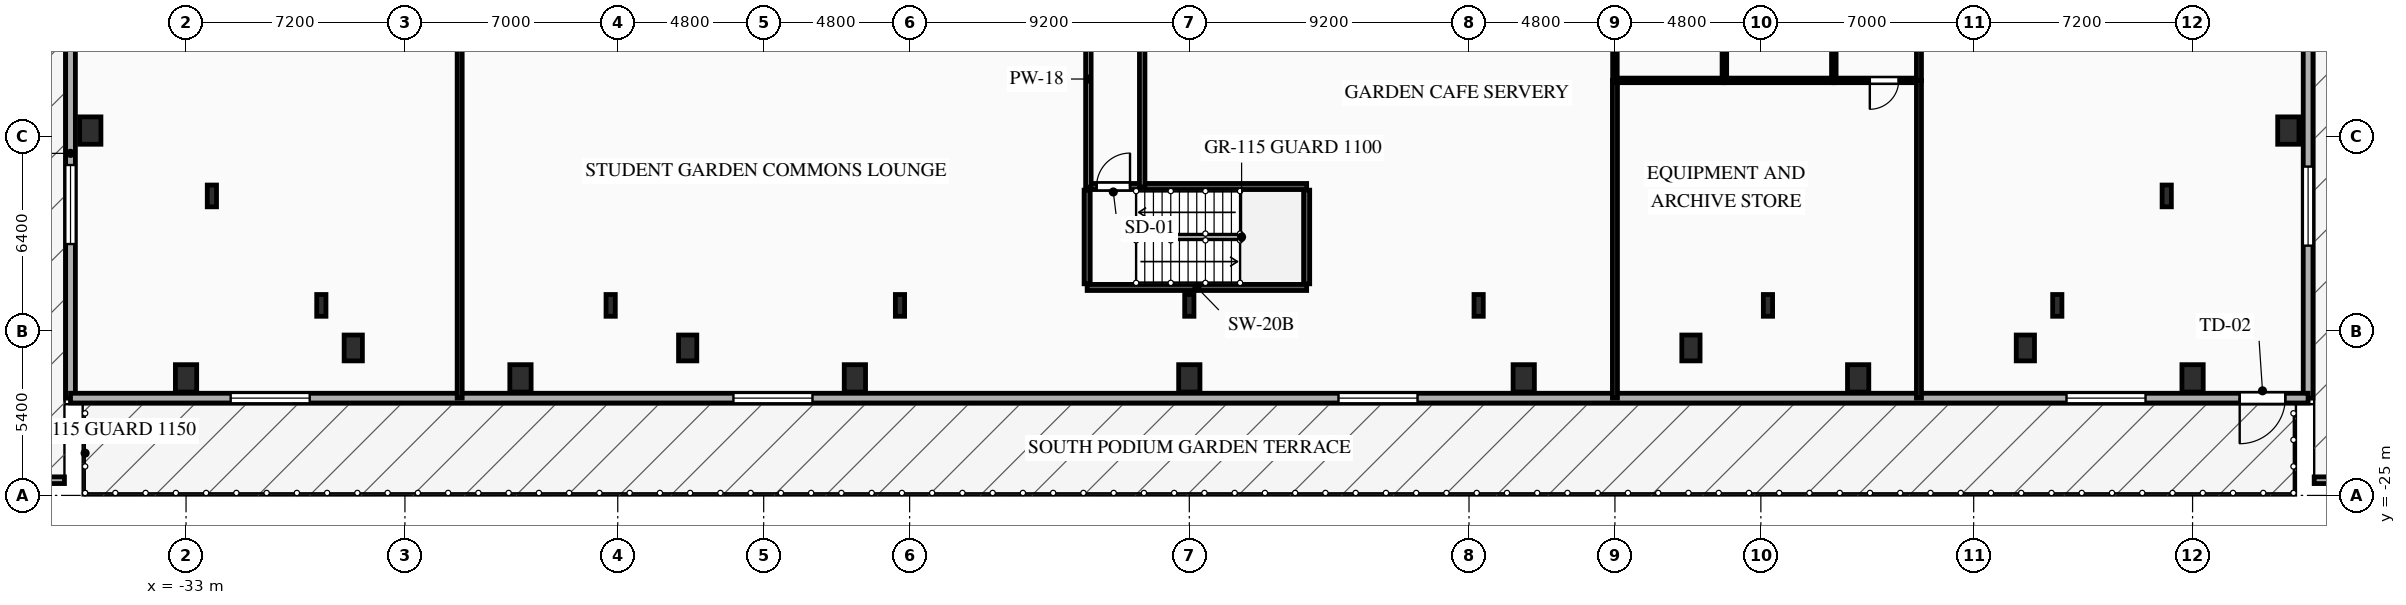
"""IFC4 building model, lengths in metres.
Left out: names, types, materials, properties, quantities, classifications, styles, units other than length and angle.
Written with IfcOpenShell. Run it as: python <this file> out.ifc"""

import sys

from ifc_helpers import new_model, si_unit, direction, frame, frame_2d, origin, origin_2d, place, context, subcontext, project, spatial, rectangle, i_section, extrude, element, fill, save


model = new_model("IFC4")
c1 = context("Model", 3, precision=1e-05, world=origin(), true_north=direction((0.0, 1.0)))
c2 = subcontext(c1, "Body", "Model", "MODEL_VIEW")
j1 = project(units=[si_unit("LENGTHUNIT", "METRE"), si_unit("PLANEANGLEUNIT", "RADIAN")], contexts=[c1])
p1 = place(None, origin())
s1 = spatial("IfcSite", under=j1, at=p1, CompositionType="ELEMENT")
p2 = place(p1, origin())
s2 = spatial("IfcBuilding", under=s1, at=p2, CompositionType="ELEMENT")
p3 = place(p2, frame((0.0, 0.0, 13.5)))
s3 = spatial("IfcBuildingStorey", under=s2, at=p3, CompositionType="ELEMENT", Elevation=13.5)
for number, where, z_axis, x_axis in (
    (1, (-33.0, -21.15, 0.0), (0.0, 0.0, 1.0), (1.0, 0.0, 0.0)),
    (2, (-22.0, -21.15, 0.0), (0.0, 0.0, 1.0), (1.0, 0.0, 0.0)),
    (3, (-11.0, -21.15, 0.0), (0.0, 0.0, 1.0), (1.0, 0.0, 0.0)),
    (4, (0.0, -21.15, 0.0), (0.0, 0.0, 1.0), (1.0, 0.0, 0.0)),
    (5, (11.0, -21.15, 0.0), (0.0, 0.0, 1.0), (1.0, 0.0, 0.0)),
    (6, (22.0, -21.15, 0.0), (0.0, 0.0, 1.0), (1.0, 0.0, 0.0)),
    (7, (33.0, -21.15, 0.0), (0.0, 0.0, 1.0), (1.0, 0.0, 0.0)),
    (8, (-36.15, -13.0, 0.0), (0.0, 0.0, 1.0), (1.0, 0.0, 0.0)),
    (9, (36.15, -13.0, 0.0), (0.0, 0.0, 1.0), (1.0, 0.0, 0.0)),
):
    element("IfcColumn", number, at=place(p3, frame(where, z_axis=z_axis, x_axis=x_axis)), inside=s3, PredefinedType="COLUMN", context=c2, shape_type="SweptSolid", body=[
        extrude(rectangle(XDim=0.7, YDim=0.9, at=origin_2d()), origin(), (0.0, 0.0, 1.0), 4.5),
    ])
for number, where, z_axis, x_axis in (
    (10, (-27.5, -20.15, 0.0), (0.0, 0.0, 1.0), (1.0, 0.0, 0.0)),
    (11, (-16.5, -20.15, 0.0), (0.0, 0.0, 1.0), (1.0, 0.0, 0.0)),
    (12, (16.5, -20.15, 0.0), (0.0, 0.0, 1.0), (1.0, 0.0, 0.0)),
    (13, (27.5, -20.15, 0.0), (0.0, 0.0, 1.0), (1.0, 0.0, 0.0)),
):
    element("IfcColumn", number, at=place(p3, frame(where, z_axis=z_axis, x_axis=x_axis)), inside=s3, PredefinedType="PILASTER", context=c2, shape_type="SweptSolid", body=[
        extrude(rectangle(XDim=0.6, YDim=0.85, at=origin_2d()), origin(), (0.0, 0.0, 1.0), 4.5),
    ])
for number, where, z_axis, x_axis in (
    (14, (-28.55, -18.75, 0.0), (0.0, 0.0, 1.0), (1.0, 0.0, 0.0)),
    (15, (-19.033, -18.75, 0.0), (0.0, 0.0, 1.0), (1.0, 0.0, 0.0)),
    (16, (-9.517, -18.75, 0.0), (0.0, 0.0, 1.0), (1.0, 0.0, 0.0)),
    (17, (0.0, -18.75, 0.0), (0.0, 0.0, 1.0), (1.0, 0.0, 0.0)),
    (18, (9.517, -18.75, 0.0), (0.0, 0.0, 1.0), (1.0, 0.0, 0.0)),
    (19, (19.033, -18.75, 0.0), (0.0, 0.0, 1.0), (1.0, 0.0, 0.0)),
    (20, (28.55, -18.75, 0.0), (0.0, 0.0, 1.0), (1.0, 0.0, 0.0)),
    (21, (32.15, -15.15, 0.0), (0.0, 0.0, 1.0), (1.0, 0.0, 0.0)),
    (22, (-32.15, -15.15, 0.0), (0.0, 0.0, 1.0), (1.0, 0.0, 0.0)),
):
    element("IfcColumn", number, at=place(p3, frame(where, z_axis=z_axis, x_axis=x_axis)), inside=s3, PredefinedType="COLUMN", context=c2, shape_type="SweptSolid", body=[
        extrude(i_section(OverallWidth=0.304, OverallDepth=0.716, WebThickness=0.021, FlangeThickness=0.04, FilletRadius=0.027, at=origin_2d()), origin(), (0.0, 0.0, 1.0), 4.5),
    ])
p4 = place(p3, frame((-36.8, -21.8, 0.0), z_axis=(0.0, 0.0, 1.0), x_axis=(0.0, 1.0, 0.0)))
e23 = element("IfcWall", 23, at=p4, inside=s3, PredefinedType="SOLIDWALL", context=c2, shape_type="SweptSolid", body=[
    extrude(rectangle(XDim=16.1, YDim=0.32, at=frame_2d((8.05, 0.0))), origin(), (0.0, 0.0, 1.0), 4.17),
])
p5 = place(p4, frame((5.067, 0.0, 0.85)))
e24 = element("IfcOpeningElement", 24, at=p5, cuts=e23, PredefinedType="OPENING", context=c2, shape_type="SweptSolid", body=[
    extrude(rectangle(XDim=2.6, YDim=2.4, at=frame_2d((1.3, 1.2))), frame((0.0, 0.17, 0.0), z_axis=(0.0, -1.0, 0.0), x_axis=(1.0, 0.0, 0.0)), (0.0, 0.0, 1.0), 0.34),
])
p6 = place(p3, frame((36.8, -5.7, 0.0), z_axis=(0.0, 0.0, 1.0), x_axis=(0.0, -1.0, 0.0)))
e25 = element("IfcWall", 25, at=p6, inside=s3, PredefinedType="SOLIDWALL", context=c2, shape_type="SweptSolid", body=[
    extrude(rectangle(XDim=16.1, YDim=0.32, at=frame_2d((8.05, 0.0))), origin(), (0.0, 0.0, 1.0), 4.17),
])
p7 = place(p6, frame((8.485, 0.0, 0.85)))
e26 = element("IfcOpeningElement", 26, at=p7, cuts=e25, PredefinedType="OPENING", context=c2, shape_type="SweptSolid", body=[
    extrude(rectangle(XDim=2.6, YDim=2.4, at=frame_2d((1.3, 1.2))), frame((0.0, 0.17, 0.0), z_axis=(0.0, -1.0, 0.0), x_axis=(1.0, 0.0, 0.0)), (0.0, 0.0, 1.0), 0.34),
])
p8 = place(p3, frame((36.8, -21.8, 0.0), z_axis=(0.0, 0.0, 1.0), x_axis=(-1.0, 0.0, 0.0)))
e27 = element("IfcWall", 27, at=p8, inside=s3, PredefinedType="SOLIDWALL", context=c2, shape_type="SweptSolid", body=[
    extrude(rectangle(XDim=73.6, YDim=0.32, at=frame_2d((36.8, 0.0))), origin(), (0.0, 0.0, 1.0), 4.17),
])
p9 = place(p8, frame((0.75, 0.0, 0.0)))
e28 = element("IfcOpeningElement", 28, at=p9, cuts=e27, PredefinedType="OPENING", context=c2, shape_type="SweptSolid", body=[
    extrude(rectangle(XDim=1.5, YDim=2.2, at=frame_2d((0.75, 1.1))), frame((0.0, 0.17, 0.0), z_axis=(0.0, -1.0, 0.0), x_axis=(1.0, 0.0, 0.0)), (0.0, 0.0, 1.0), 0.34),
])
p10 = place(p8, frame((5.347, 0.0, 0.85)))
e29 = element("IfcOpeningElement", 29, at=p10, cuts=e27, PredefinedType="OPENING", context=c2, shape_type="SweptSolid", body=[
    extrude(rectangle(XDim=2.6, YDim=2.4, at=frame_2d((1.3, 1.2))), frame((0.0, 0.17, 0.0), z_axis=(0.0, -1.0, 0.0), x_axis=(1.0, 0.0, 0.0)), (0.0, 0.0, 1.0), 0.34),
])
p11 = place(p8, frame((29.293, 0.0, 0.85)))
e30 = element("IfcOpeningElement", 30, at=p11, cuts=e27, PredefinedType="OPENING", context=c2, shape_type="SweptSolid", body=[
    extrude(rectangle(XDim=2.6, YDim=2.4, at=frame_2d((1.3, 1.2))), frame((0.0, 0.17, 0.0), z_axis=(0.0, -1.0, 0.0), x_axis=(1.0, 0.0, 0.0)), (0.0, 0.0, 1.0), 0.34),
])
p12 = place(p8, frame((49.195, 0.0, 0.85)))
e31 = element("IfcOpeningElement", 31, at=p12, cuts=e27, PredefinedType="OPENING", context=c2, shape_type="SweptSolid", body=[
    extrude(rectangle(XDim=2.6, YDim=2.4, at=frame_2d((1.3, 1.2))), frame((0.0, 0.17, 0.0), z_axis=(0.0, -1.0, 0.0), x_axis=(1.0, 0.0, 0.0)), (0.0, 0.0, 1.0), 0.34),
])
p13 = place(p8, frame((65.733, 0.0, 0.85)))
e32 = element("IfcOpeningElement", 32, at=p13, cuts=e27, PredefinedType="OPENING", context=c2, shape_type="SweptSolid", body=[
    extrude(rectangle(XDim=2.6, YDim=2.4, at=frame_2d((1.3, 1.2))), frame((0.0, 0.17, 0.0), z_axis=(0.0, -1.0, 0.0), x_axis=(1.0, 0.0, 0.0)), (0.0, 0.0, 1.0), 0.34),
])
for number, where, z_axis, x_axis in (
    (33, (-38.5, -24.5, 0.0), (0.0, 0.0, 1.0), (1.0, 0.0, 0.0)),
    (34, (37.0, -24.5, 0.0), (0.0, 0.0, 1.0), (1.0, 0.0, 0.0)),
):
    element("IfcWall", number, at=place(p3, frame(where, z_axis=z_axis, x_axis=x_axis)), inside=s3, PredefinedType="PARAPET", context=c2, shape_type="SweptSolid", body=[
        extrude(rectangle(XDim=1.5, YDim=0.22, at=frame_2d((0.75, 0.0))), origin(), (0.0, 0.0, 1.0), 0.65),
    ])
p14 = place(p3, frame((-3.36, -14.84, 0.0), z_axis=(0.0, 0.0, 1.0), x_axis=(1.0, 0.0, 0.0)))
e35 = element("IfcWall", 35, at=p14, inside=s3, PredefinedType="SHEAR", context=c2, shape_type="SweptSolid", body=[
    extrude(rectangle(XDim=7.22, YDim=0.2, at=frame_2d((3.61, 0.0))), origin(), (0.0, 0.0, 1.0), 4.17),
])
p15 = place(p14, frame((0.31, 0.0, 0.0)))
e36 = element("IfcOpeningElement", 36, at=p15, cuts=e35, PredefinedType="OPENING", context=c2, shape_type="SweptSolid", body=[
    extrude(rectangle(XDim=1.1, YDim=2.15, at=frame_2d((0.55, 1.075))), frame((0.0, 0.11, 0.0), z_axis=(0.0, -1.0, 0.0), x_axis=(1.0, 0.0, 0.0)), (0.0, 0.0, 1.0), 0.22),
])
p16 = place(p3, frame((-3.36, -18.16, 0.0), z_axis=(0.0, 0.0, 1.0), x_axis=(1.0, 0.0, 0.0)))
e37 = element("IfcWall", 37, at=p16, inside=s3, PredefinedType="SHEAR", context=c2, shape_type="SweptSolid", body=[
    extrude(rectangle(XDim=7.22, YDim=0.2, at=frame_2d((3.61, 0.0))), origin(), (0.0, 0.0, 1.0), 4.17),
])
for number, where, z_axis, x_axis in (
    (38, (-3.36, -18.04, 0.0), (0.0, 0.0, 1.0), (0.0, 1.0, 0.0)),
    (39, (3.86, -18.04, 0.0), (0.0, 0.0, 1.0), (0.0, 1.0, 0.0)),
):
    element("IfcWall", number, at=place(p3, frame(where, z_axis=z_axis, x_axis=x_axis)), inside=s3, PredefinedType="SHEAR", context=c2, shape_type="SweptSolid", body=[
        extrude(rectangle(XDim=3.08, YDim=0.2, at=frame_2d((1.54, 0.0))), origin(), (0.0, 0.0, 1.0), 4.17),
    ])
for number, where, z_axis, x_axis in (
    (40, (-3.32, -14.86, 0.0), (0.0, 0.0, 1.0), (0.0, 1.0, 0.0)),
    (41, (-1.55, -7.75, 0.0), (0.0, 0.0, 1.0), (0.0, -1.0, 0.0)),
):
    element("IfcWall", number, at=place(p3, frame(where, z_axis=z_axis, x_axis=x_axis)), inside=s3, PredefinedType="PARTITIONING", context=c2, shape_type="SweptSolid", body=[
        extrude(rectangle(XDim=7.11, YDim=0.18, at=frame_2d((3.555, 0.0))), origin(), (0.0, 0.0, 1.0), 4.17),
    ])
p17 = place(p3, frame((-24.0, -21.8, 0.0), z_axis=(0.0, 0.0, 1.0), x_axis=(0.0, 1.0, 0.0)))
e42 = element("IfcWall", 42, at=p17, inside=s3, PredefinedType="PARTITIONING", context=c2, shape_type="SweptSolid", body=[
    extrude(rectangle(XDim=14.05, YDim=0.165, at=frame_2d((7.025, 0.0))), origin(), (0.0, 0.0, 1.0), 4.17),
])
p18 = place(p3, frame((14.0, -7.75, 0.0), z_axis=(0.0, 0.0, 1.0), x_axis=(0.0, -1.0, 0.0)))
e43 = element("IfcWall", 43, at=p18, inside=s3, PredefinedType="PLUMBINGWALL", context=c2, shape_type="SweptSolid", body=[
    extrude(rectangle(XDim=3.6, YDim=0.15, at=frame_2d((1.8, 0.0))), origin(), (0.0, 0.0, 1.0), 4.17),
])
p19 = place(p3, frame((14.0, -11.35, 0.0), z_axis=(0.0, 0.0, 1.0), x_axis=(0.0, -1.0, 0.0)))
e44 = element("IfcWall", 44, at=p19, inside=s3, PredefinedType="PARTITIONING", context=c2, shape_type="SweptSolid", body=[
    extrude(rectangle(XDim=10.45, YDim=0.165, at=frame_2d((5.225, 0.0))), origin(), (0.0, 0.0, 1.0), 4.17),
])
for number, where, z_axis, x_axis in (
    (45, (17.6, -7.75, 0.0), (0.0, 0.0, 1.0), (0.0, -1.0, 0.0)),
    (46, (17.6, -11.35, 0.0), (0.0, 0.0, 1.0), (-1.0, 0.0, 0.0)),
    (47, (21.2, -7.75, 0.0), (0.0, 0.0, 1.0), (0.0, -1.0, 0.0)),
):
    element("IfcWall", number, at=place(p3, frame(where, z_axis=z_axis, x_axis=x_axis)), inside=s3, PredefinedType="PLUMBINGWALL", context=c2, shape_type="SweptSolid", body=[
        extrude(rectangle(XDim=3.6, YDim=0.15, at=frame_2d((1.8, 0.0))), origin(), (0.0, 0.0, 1.0), 4.17),
    ])
p20 = place(p3, frame((21.2, -11.35, 0.0), z_axis=(0.0, 0.0, 1.0), x_axis=(-1.0, 0.0, 0.0)))
e48 = element("IfcWall", 48, at=p20, inside=s3, PredefinedType="PLUMBINGWALL", context=c2, shape_type="SweptSolid", body=[
    extrude(rectangle(XDim=3.6, YDim=0.15, at=frame_2d((1.8, 0.0))), origin(), (0.0, 0.0, 1.0), 4.17),
])
p21 = place(p3, frame((24.0, -11.35, 0.0), z_axis=(0.0, 0.0, 1.0), x_axis=(-1.0, 0.0, 0.0)))
e49 = element("IfcWall", 49, at=p21, inside=s3, PredefinedType="PARTITIONING", context=c2, shape_type="SweptSolid", body=[
    extrude(rectangle(XDim=2.8, YDim=0.15, at=frame_2d((1.4, 0.0))), origin(), (0.0, 0.0, 1.0), 4.17),
])
p22 = place(p21, frame((0.666, 0.0, 0.0)))
e50 = element("IfcOpeningElement", 50, at=p22, cuts=e49, PredefinedType="OPENING", context=c2, shape_type="SweptSolid", body=[
    extrude(rectangle(XDim=0.95, YDim=2.1, at=frame_2d((0.475, 1.05))), frame((0.0, 0.085, 0.0), z_axis=(0.0, -1.0, 0.0), x_axis=(1.0, 0.0, 0.0)), (0.0, 0.0, 1.0), 0.17),
])
p23 = place(p3, frame((24.0, -7.75, 0.0), z_axis=(0.0, 0.0, 1.0), x_axis=(0.0, -1.0, 0.0)))
e51 = element("IfcWall", 51, at=p23, inside=s3, PredefinedType="PARTITIONING", context=c2, shape_type="SweptSolid", body=[
    extrude(rectangle(XDim=3.6, YDim=0.165, at=frame_2d((1.8, 0.0))), origin(), (0.0, 0.0, 1.0), 4.17),
])
p24 = place(p3, frame((24.0, -11.35, 0.0), z_axis=(0.0, 0.0, 1.0), x_axis=(0.0, -1.0, 0.0)))
e52 = element("IfcWall", 52, at=p24, inside=s3, PredefinedType="PARTITIONING", context=c2, shape_type="SweptSolid", body=[
    extrude(rectangle(XDim=10.45, YDim=0.165, at=frame_2d((5.225, 0.0))), origin(), (0.0, 0.0, 1.0), 4.17),
])
p25 = place(p5, origin())
e53 = element("IfcWindow", 53, at=p25, inside=s3, PartitioningType="SINGLE_PANEL", PredefinedType="WINDOW", context=c2, shape_type="SweptSolid", body=[
    extrude(rectangle(XDim=2.6, YDim=2.4, at=frame_2d((1.3, 1.2))), frame((0.0, 0.03, 0.0), z_axis=(0.0, -1.0, 0.0), x_axis=(1.0, 0.0, 0.0)), (0.0, 0.0, 1.0), 0.06),
])
fill(e24, e53)
p26 = place(p7, origin())
e54 = element("IfcWindow", 54, at=p26, inside=s3, PartitioningType="SINGLE_PANEL", PredefinedType="WINDOW", context=c2, shape_type="SweptSolid", body=[
    extrude(rectangle(XDim=2.6, YDim=2.4, at=frame_2d((1.3, 1.2))), frame((0.0, 0.03, 0.0), z_axis=(0.0, -1.0, 0.0), x_axis=(1.0, 0.0, 0.0)), (0.0, 0.0, 1.0), 0.06),
])
fill(e26, e54)
p27 = place(p9, origin())
e55 = element("IfcDoor", 55, at=p27, inside=s3, OperationType="SINGLE_SWING_RIGHT", PredefinedType="DOOR", context=c2, shape_type="SweptSolid", body=[
    extrude(rectangle(XDim=1.5, YDim=2.2, at=frame_2d((0.75, 1.1))), frame((0.0, 0.025, 0.0), z_axis=(0.0, -1.0, 0.0), x_axis=(1.0, 0.0, 0.0)), (0.0, 0.0, 1.0), 0.05),
])
fill(e28, e55)
p28 = place(p10, origin())
e56 = element("IfcWindow", 56, at=p28, inside=s3, PartitioningType="SINGLE_PANEL", PredefinedType="WINDOW", context=c2, shape_type="SweptSolid", body=[
    extrude(rectangle(XDim=2.6, YDim=2.4, at=frame_2d((1.3, 1.2))), frame((0.0, 0.03, 0.0), z_axis=(0.0, -1.0, 0.0), x_axis=(1.0, 0.0, 0.0)), (0.0, 0.0, 1.0), 0.06),
])
fill(e29, e56)
p29 = place(p11, origin())
e57 = element("IfcWindow", 57, at=p29, inside=s3, PartitioningType="SINGLE_PANEL", PredefinedType="WINDOW", context=c2, shape_type="SweptSolid", body=[
    extrude(rectangle(XDim=2.6, YDim=2.4, at=frame_2d((1.3, 1.2))), frame((0.0, 0.03, 0.0), z_axis=(0.0, -1.0, 0.0), x_axis=(1.0, 0.0, 0.0)), (0.0, 0.0, 1.0), 0.06),
])
fill(e30, e57)
p30 = place(p12, origin())
e58 = element("IfcWindow", 58, at=p30, inside=s3, PartitioningType="SINGLE_PANEL", PredefinedType="WINDOW", context=c2, shape_type="SweptSolid", body=[
    extrude(rectangle(XDim=2.6, YDim=2.4, at=frame_2d((1.3, 1.2))), frame((0.0, 0.03, 0.0), z_axis=(0.0, -1.0, 0.0), x_axis=(1.0, 0.0, 0.0)), (0.0, 0.0, 1.0), 0.06),
])
fill(e31, e58)
p31 = place(p13, origin())
e59 = element("IfcWindow", 59, at=p31, inside=s3, PartitioningType="SINGLE_PANEL", PredefinedType="WINDOW", context=c2, shape_type="SweptSolid", body=[
    extrude(rectangle(XDim=2.6, YDim=2.4, at=frame_2d((1.3, 1.2))), frame((0.0, 0.03, 0.0), z_axis=(0.0, -1.0, 0.0), x_axis=(1.0, 0.0, 0.0)), (0.0, 0.0, 1.0), 0.06),
])
fill(e32, e59)
p32 = place(p15, origin())
e60 = element("IfcDoor", 60, at=p32, inside=s3, OperationType="SINGLE_SWING_RIGHT", PredefinedType="DOOR", context=c2, shape_type="SweptSolid", body=[
    extrude(rectangle(XDim=1.1, YDim=2.15, at=frame_2d((0.55, 1.075))), frame((0.0, 0.025, 0.0), z_axis=(0.0, -1.0, 0.0), x_axis=(1.0, 0.0, 0.0)), (0.0, 0.0, 1.0), 0.05),
])
fill(e36, e60)
p33 = place(p22, origin())
e61 = element("IfcDoor", 61, at=p33, inside=s3, OperationType="SINGLE_SWING_RIGHT", PredefinedType="DOOR", context=c2, shape_type="SweptSolid", body=[
    extrude(rectangle(XDim=0.95, YDim=2.1, at=frame_2d((0.475, 1.05))), frame((0.0, 0.025, 0.0), z_axis=(0.0, -1.0, 0.0), x_axis=(1.0, 0.0, 0.0)), (0.0, 0.0, 1.0), 0.05),
])
fill(e50, e61)
save(model, sys.argv[1])
